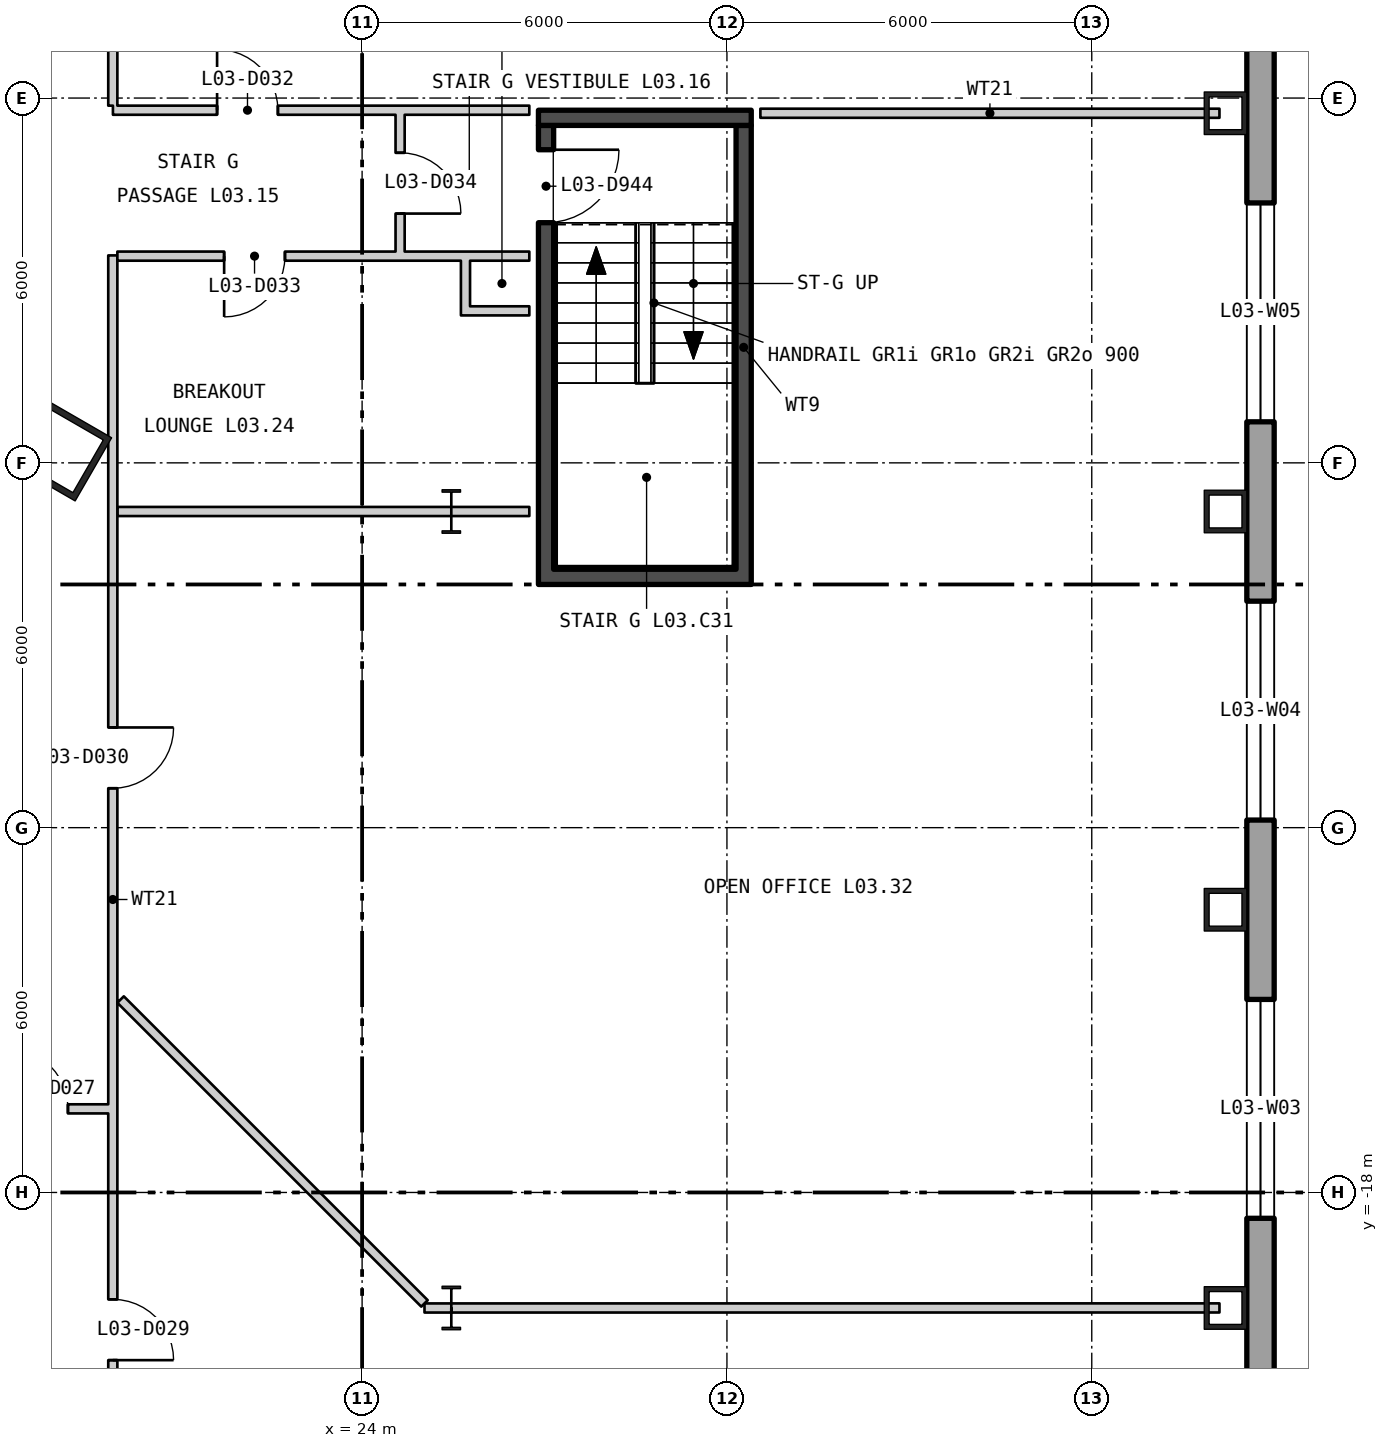
"""IFC4 building model, lengths in metres.
Left out: names, types, materials, properties, quantities, classifications, styles, units other than length and angle.
Written with IfcOpenShell. Run it as: python <this file> out.ifc"""

import sys

from ifc_helpers import new_model, si_unit, direction, frame, frame_2d, origin, origin_2d, place, context, subcontext, project, spatial, polyline, rectangle, hollow_rectangle, i_section, outline, extrude, element, fill, save


model = new_model("IFC4")
c1 = context("Model", 3, precision=1e-05, world=origin(), true_north=direction((0.0, 1.0)))
c2 = subcontext(c1, "Body", "Model", "MODEL_VIEW")
j1 = project(units=[si_unit("LENGTHUNIT", "METRE"), si_unit("PLANEANGLEUNIT", "RADIAN")], contexts=[c1])
p1 = place(None, origin())
s1 = spatial("IfcSite", under=j1, at=p1, CompositionType="ELEMENT")
p2 = place(p1, origin())
s2 = spatial("IfcBuilding", under=s1, at=p2, CompositionType="ELEMENT")
p3 = place(p2, frame((0.0, 0.0, 18.6)))
s3 = spatial("IfcBuildingStorey", under=s2, at=p3, CompositionType="ELEMENT", Elevation=18.6)
p4 = place(p3, frame((19.061, -5.807, 0.0), z_axis=(0.0, 0.0, 1.0), x_axis=(0.5, 0.866025403784, 0.0)))
e1 = element("IfcColumn", 1, at=p4, inside=s3, PredefinedType="COLUMN", context=c2, shape_type="SweptSolid", body=[
    extrude(hollow_rectangle(XDim=1.2, YDim=1.2, WallThickness=0.1, at=origin_2d()), origin(), (0.0, 0.0, 1.0), 5.1),
])
for number, where, z_axis, x_axis in (
    (2, (38.2, -19.9, 0.0), (0.0, 0.0, 1.0), (0.0, 1.0, 0.0)),
    (3, (38.2, -13.35, 0.0), (0.0, 0.0, 1.0), (0.0, 1.0, 0.0)),
    (4, (38.2, -6.8, 0.0), (0.0, 0.0, 1.0), (0.0, 1.0, 0.0)),
    (5, (38.2, -0.25, 0.0), (0.0, 0.0, 1.0), (0.0, 1.0, 0.0)),
):
    element("IfcColumn", number, at=place(p3, frame(where, z_axis=z_axis, x_axis=x_axis)), inside=s3, PredefinedType="COLUMN", context=c2, shape_type="SweptSolid", body=[
        extrude(hollow_rectangle(XDim=0.7, YDim=0.7, WallThickness=0.08, at=origin_2d()), origin(), (0.0, 0.0, 1.0), 5.1),
    ])
for number, where, z_axis, x_axis in (
    (6, (25.467, -6.8, 0.0), (0.0, 0.0, 1.0), (1.0, 0.0, 0.0)),
    (7, (25.467, -19.9, 0.0), (0.0, 0.0, 1.0), (1.0, 0.0, 0.0)),
):
    element("IfcColumn", number, at=place(p3, frame(where, z_axis=z_axis, x_axis=x_axis)), inside=s3, PredefinedType="COLUMN", context=c2, shape_type="SweptSolid", body=[
        extrude(i_section(OverallWidth=0.304, OverallDepth=0.716, WebThickness=0.021, FlangeThickness=0.04, at=origin_2d()), origin(), (0.0, 0.0, 1.0), 5.1),
    ])
p5 = place(p3, frame((38.775, -33.575, -0.4), z_axis=(0.0, 0.0, 1.0), x_axis=(0.0, 1.0, 0.0)))
e8 = element("IfcWall", 8, at=p5, inside=s3, PredefinedType="SOLIDWALL", context=c2, shape_type="SweptSolid", body=[
    extrude(outline(polyline([(-0.225, -0.225), (53.775, -0.225), (53.325, 0.225), (0.225, 0.225), (-0.225, -0.225)])), origin(), (0.0, 0.0, 1.0), 5.1),
])
p6 = place(p5, frame((2.05, 0.0, 1.3)))
e9 = element("IfcOpeningElement", 9, at=p6, cuts=e8, PredefinedType="OPENING", context=c2, shape_type="SweptSolid", body=[
    extrude(rectangle(XDim=3.6, YDim=3.2, at=frame_2d((1.8, 1.6))), frame((0.0, 0.235, 0.0), z_axis=(0.0, -1.0, 0.0), x_axis=(1.0, 0.0, 0.0)), (0.0, 0.0, 1.0), 0.47),
])
p7 = place(p5, frame((8.6, 0.0, 1.3)))
e10 = element("IfcOpeningElement", 10, at=p7, cuts=e8, PredefinedType="OPENING", context=c2, shape_type="SweptSolid", body=[
    extrude(rectangle(XDim=3.6, YDim=3.2, at=frame_2d((1.8, 1.6))), frame((0.0, 0.235, 0.0), z_axis=(0.0, -1.0, 0.0), x_axis=(1.0, 0.0, 0.0)), (0.0, 0.0, 1.0), 0.47),
])
p8 = place(p5, frame((15.15, 0.0, 1.3)))
e11 = element("IfcOpeningElement", 11, at=p8, cuts=e8, PredefinedType="OPENING", context=c2, shape_type="SweptSolid", body=[
    extrude(rectangle(XDim=3.6, YDim=3.2, at=frame_2d((1.8, 1.6))), frame((0.0, 0.235, 0.0), z_axis=(0.0, -1.0, 0.0), x_axis=(1.0, 0.0, 0.0)), (0.0, 0.0, 1.0), 0.47),
])
p9 = place(p5, frame((21.7, 0.0, 1.3)))
e12 = element("IfcOpeningElement", 12, at=p9, cuts=e8, PredefinedType="OPENING", context=c2, shape_type="SweptSolid", body=[
    extrude(rectangle(XDim=3.6, YDim=3.2, at=frame_2d((1.8, 1.6))), frame((0.0, 0.235, 0.0), z_axis=(0.0, -1.0, 0.0), x_axis=(1.0, 0.0, 0.0)), (0.0, 0.0, 1.0), 0.47),
])
p10 = place(p5, frame((28.25, 0.0, 1.3)))
e13 = element("IfcOpeningElement", 13, at=p10, cuts=e8, PredefinedType="OPENING", context=c2, shape_type="SweptSolid", body=[
    extrude(rectangle(XDim=3.6, YDim=3.2, at=frame_2d((1.8, 1.6))), frame((0.0, 0.235, 0.0), z_axis=(0.0, -1.0, 0.0), x_axis=(1.0, 0.0, 0.0)), (0.0, 0.0, 1.0), 0.47),
])
p11 = place(p5, frame((34.8, 0.0, 1.3)))
e14 = element("IfcOpeningElement", 14, at=p11, cuts=e8, PredefinedType="OPENING", context=c2, shape_type="SweptSolid", body=[
    extrude(rectangle(XDim=3.6, YDim=3.2, at=frame_2d((1.8, 1.6))), frame((0.0, 0.235, 0.0), z_axis=(0.0, -1.0, 0.0), x_axis=(1.0, 0.0, 0.0)), (0.0, 0.0, 1.0), 0.47),
])
p12 = place(p5, frame((41.35, 0.0, 1.3)))
e15 = element("IfcOpeningElement", 15, at=p12, cuts=e8, PredefinedType="OPENING", context=c2, shape_type="SweptSolid", body=[
    extrude(rectangle(XDim=3.6, YDim=3.2, at=frame_2d((1.8, 1.6))), frame((0.0, 0.235, 0.0), z_axis=(0.0, -1.0, 0.0), x_axis=(1.0, 0.0, 0.0)), (0.0, 0.0, 1.0), 0.47),
])
p13 = place(p5, frame((47.9, 0.0, 1.3)))
e16 = element("IfcOpeningElement", 16, at=p13, cuts=e8, PredefinedType="OPENING", context=c2, shape_type="SweptSolid", body=[
    extrude(rectangle(XDim=3.6, YDim=3.2, at=frame_2d((1.8, 1.6))), frame((0.0, 0.235, 0.0), z_axis=(0.0, -1.0, 0.0), x_axis=(1.0, 0.0, 0.0)), (0.0, 0.0, 1.0), 0.47),
])
p14 = place(p3, frame((27.025, -7.75, 0.0), z_axis=(0.0, 0.0, 1.0), x_axis=(0.0, 1.0, 0.0)))
e17 = element("IfcWall", 17, at=p14, inside=s3, PredefinedType="SHEAR", context=c2, shape_type="SweptSolid", body=[
    extrude(rectangle(XDim=7.3, YDim=0.25, at=frame_2d((3.65, 0.0))), origin(), (0.0, 0.0, 1.0), 4.88),
])
p15 = place(p14, frame((5.7, 0.0, 0.0)))
e18 = element("IfcOpeningElement", 18, at=p15, cuts=e17, PredefinedType="OPENING", context=c2, shape_type="SweptSolid", body=[
    extrude(rectangle(XDim=1.2, YDim=2.1, at=frame_2d((0.6, 1.05))), frame((0.0, 0.135, 0.0), z_axis=(0.0, -1.0, 0.0), x_axis=(1.0, 0.0, 0.0)), (0.0, 0.0, 1.0), 0.27),
])
p16 = place(p3, frame((30.275, -7.75, 0.0), z_axis=(0.0, 0.0, 1.0), x_axis=(0.0, 1.0, 0.0)))
e19 = element("IfcWall", 19, at=p16, inside=s3, PredefinedType="SHEAR", context=c2, shape_type="SweptSolid", body=[
    extrude(rectangle(XDim=7.3, YDim=0.25, at=frame_2d((3.65, 0.0))), origin(), (0.0, 0.0, 1.0), 4.88),
])
for number, where, z_axis, x_axis in (
    (20, (26.9, -7.875, 0.0), (0.0, 0.0, 1.0), (1.0, 0.0, 0.0)),
    (21, (26.9, -0.325, 0.0), (0.0, 0.0, 1.0), (1.0, 0.0, 0.0)),
):
    element("IfcWall", number, at=place(p3, frame(where, z_axis=z_axis, x_axis=x_axis)), inside=s3, PredefinedType="SHEAR", context=c2, shape_type="SweptSolid", body=[
        extrude(rectangle(XDim=3.5, YDim=0.25, at=frame_2d((1.75, 0.0))), origin(), (0.0, 0.0, 1.0), 4.88),
    ])
p17 = place(p3, frame((17.5, -16.625, 0.0), z_axis=(0.0, 0.0, 1.0), x_axis=(1.0, 0.0, 0.0)))
e22 = element("IfcWall", 22, at=p17, inside=s3, PredefinedType="PARTITIONING", context=c2, shape_type="SweptSolid", body=[
    extrude(rectangle(XDim=2.325, YDim=0.15, at=frame_2d((1.163, 0.0))), origin(), (0.0, 0.0, 1.0), 4.88),
])
p18 = place(p17, frame((0.662, 0.0, 0.0)))
e23 = element("IfcOpeningElement", 23, at=p18, cuts=e22, PredefinedType="OPENING", context=c2, shape_type="SweptSolid", body=[
    extrude(rectangle(XDim=1.0, YDim=2.1, at=frame_2d((0.5, 1.05))), frame((0.0, 0.085, 0.0), z_axis=(0.0, -1.0, 0.0), x_axis=(1.0, 0.0, 0.0)), (0.0, 0.0, 1.0), 0.17),
])
p19 = place(p3, frame((19.9, -23.775, 0.0), z_axis=(0.0, 0.0, 1.0), x_axis=(0.0, 1.0, 0.0)))
e24 = element("IfcWall", 24, at=p19, inside=s3, PredefinedType="PARTITIONING", context=c2, shape_type="SweptSolid", body=[
    extrude(rectangle(XDim=21.187, YDim=0.15, at=frame_2d((10.594, 0.0))), origin(), (0.0, 0.0, 1.0), 4.88),
])
p20 = place(p19, frame((3.017, 0.0, 0.0)))
e25 = element("IfcOpeningElement", 25, at=p20, cuts=e24, PredefinedType="OPENING", context=c2, shape_type="SweptSolid", body=[
    extrude(rectangle(XDim=1.0, YDim=2.1, at=frame_2d((0.5, 1.05))), frame((0.0, 0.085, 0.0), z_axis=(0.0, -1.0, 0.0), x_axis=(1.0, 0.0, 0.0)), (0.0, 0.0, 1.0), 0.17),
])
p21 = place(p19, frame((12.423, 0.0, 0.0)))
e26 = element("IfcOpeningElement", 26, at=p21, cuts=e24, PredefinedType="OPENING", context=c2, shape_type="SweptSolid", body=[
    extrude(rectangle(XDim=1.0, YDim=2.1, at=frame_2d((0.5, 1.05))), frame((0.0, 0.085, 0.0), z_axis=(0.0, -1.0, 0.0), x_axis=(1.0, 0.0, 0.0)), (0.0, 0.0, 1.0), 0.17),
])
p22 = place(p3, frame((19.9, -0.125, 0.0), z_axis=(0.0, 0.0, 1.0), x_axis=(0.0, 1.0, 0.0)))
e27 = element("IfcWall", 27, at=p22, inside=s3, PredefinedType="PARTITIONING", context=c2, shape_type="SweptSolid", body=[
    extrude(rectangle(XDim=1.15, YDim=0.15, at=frame_2d((0.575, 0.0))), origin(), (0.0, 0.0, 1.0), 4.88),
])
p23 = place(p3, frame((19.902, -0.2, 0.0), z_axis=(0.0, 0.0, 1.0), x_axis=(1.0, 0.0, 0.0)))
e28 = element("IfcWall", 28, at=p23, inside=s3, PredefinedType="PARTITIONING", context=c2, shape_type="SweptSolid", body=[
    extrude(rectangle(XDim=6.848, YDim=0.15, at=frame_2d((3.424, 0.0))), origin(), (0.0, 0.0, 1.0), 4.88),
])
p24 = place(p23, frame((1.713, 0.0, 0.0)))
e29 = element("IfcOpeningElement", 29, at=p24, cuts=e28, PredefinedType="OPENING", context=c2, shape_type="SweptSolid", body=[
    extrude(rectangle(XDim=1.0, YDim=2.1, at=frame_2d((0.5, 1.05))), frame((0.0, 0.085, 0.0), z_axis=(0.0, -1.0, 0.0), x_axis=(1.0, 0.0, 0.0)), (0.0, 0.0, 1.0), 0.17),
])
p25 = place(p3, frame((19.975, -6.8, 0.0), z_axis=(0.0, 0.0, 1.0), x_axis=(1.0, 0.0, 0.0)))
e30 = element("IfcWall", 30, at=p25, inside=s3, PredefinedType="PARTITIONING", context=c2, shape_type="SweptSolid", body=[
    extrude(rectangle(XDim=6.775, YDim=0.15, at=frame_2d((3.388, 0.0))), origin(), (0.0, 0.0, 1.0), 4.09),
])
p26 = place(p3, frame((19.975, -2.6, 0.0), z_axis=(0.0, 0.0, 1.0), x_axis=(1.0, 0.0, 0.0)))
e31 = element("IfcWall", 31, at=p26, inside=s3, PredefinedType="PARTITIONING", context=c2, shape_type="SweptSolid", body=[
    extrude(rectangle(XDim=5.713, YDim=0.15, at=frame_2d((2.857, 0.0))), origin(), (0.0, 0.0, 1.0), 4.88),
])
p27 = place(p26, frame((1.756, 0.0, 0.0)))
e32 = element("IfcOpeningElement", 32, at=p27, cuts=e31, PredefinedType="OPENING", context=c2, shape_type="SweptSolid", body=[
    extrude(rectangle(XDim=1.0, YDim=2.1, at=frame_2d((0.5, 1.05))), frame((0.0, 0.085, 0.0), z_axis=(0.0, -1.0, 0.0), x_axis=(1.0, 0.0, 0.0)), (0.0, 0.0, 1.0), 0.17),
])
p28 = place(p3, frame((20.028, -14.827, 0.0), z_axis=(0.0, 0.0, 1.0), x_axis=(0.707106781187, -0.707106781187, 0.0)))
e33 = element("IfcWall", 33, at=p28, inside=s3, PredefinedType="PARTITIONING", context=c2, shape_type="SweptSolid", body=[
    extrude(rectangle(XDim=7.068, YDim=0.15, at=frame_2d((3.534, 0.0))), origin(), (0.0, 0.0, 1.0), 4.88),
])
p29 = place(p3, frame((24.625, -2.525, 0.0), z_axis=(0.0, 0.0, 1.0), x_axis=(0.0, 1.0, 0.0)))
e34 = element("IfcWall", 34, at=p29, inside=s3, PredefinedType="PARTITIONING", context=c2, shape_type="SweptSolid", body=[
    extrude(rectangle(XDim=2.25, YDim=0.15, at=frame_2d((1.125, 0.0))), origin(), (0.0, 0.0, 1.0), 4.88),
])
p30 = place(p29, frame((0.625, 0.0, 0.0)))
e35 = element("IfcOpeningElement", 35, at=p30, cuts=e34, PredefinedType="OPENING", context=c2, shape_type="SweptSolid", body=[
    extrude(rectangle(XDim=1.0, YDim=2.1, at=frame_2d((0.5, 1.05))), frame((0.0, 0.085, 0.0), z_axis=(0.0, -1.0, 0.0), x_axis=(1.0, 0.0, 0.0)), (0.0, 0.0, 1.0), 0.17),
])
p31 = place(p3, frame((25.026, -19.9, 0.0), z_axis=(0.0, 0.0, 1.0), x_axis=(1.0, 0.0, 0.0)))
e36 = element("IfcWall", 36, at=p31, inside=s3, PredefinedType="PARTITIONING", context=c2, shape_type="SweptSolid", body=[
    extrude(rectangle(XDim=0.441, YDim=0.15, at=frame_2d((0.221, 0.0))), origin(), (0.0, 0.0, 1.0), 4.88),
])
p32 = place(p3, frame((25.467, -19.9, 0.0), z_axis=(0.0, 0.0, 1.0), x_axis=(0.999999996867, 7.9157761e-05, 0.0)))
e37 = element("IfcWall", 37, at=p32, inside=s3, PredefinedType="PARTITIONING", context=c2, shape_type="SweptSolid", body=[
    extrude(rectangle(XDim=12.633, YDim=0.15, at=frame_2d((6.316, 0.0))), origin(), (0.0, 0.0, 1.0), 4.09),
])
p33 = place(p3, frame((25.625, -3.5, 0.0), z_axis=(0.0, 0.0, 1.0), x_axis=(1.0, 0.0, 0.0)))
e38 = element("IfcWall", 38, at=p33, inside=s3, PredefinedType="PARTITIONING", context=c2, shape_type="SweptSolid", body=[
    extrude(rectangle(XDim=1.125, YDim=0.15, at=frame_2d((0.562, 0.0))), origin(), (0.0, 0.0, 1.0), 4.88),
])
p34 = place(p3, frame((25.688, -2.6, 0.0), z_axis=(0.0, 0.0, 1.0), x_axis=(1.0, 0.0, 0.0)))
e39 = element("IfcWall", 39, at=p34, inside=s3, PredefinedType="PARTITIONING", context=c2, shape_type="SweptSolid", body=[
    extrude(rectangle(XDim=1.062, YDim=0.15, at=frame_2d((0.531, 0.0))), origin(), (0.0, 0.0, 1.0), 4.88),
])
p35 = place(p3, frame((25.7, -3.425, 0.0), z_axis=(0.0, 0.0, 1.0), x_axis=(0.0, 1.0, 0.0)))
e40 = element("IfcWall", 40, at=p35, inside=s3, PredefinedType="PARTITIONING", context=c2, shape_type="SweptSolid", body=[
    extrude(rectangle(XDim=0.75, YDim=0.15, at=frame_2d((0.375, 0.0))), origin(), (0.0, 0.0, 1.0), 4.88),
])
p36 = place(p3, frame((30.55, -0.25, 0.0), z_axis=(0.0, 0.0, 1.0), x_axis=(1.0, 0.0, 0.0)))
e41 = element("IfcWall", 41, at=p36, inside=s3, PredefinedType="PARTITIONING", context=c2, shape_type="SweptSolid", body=[
    extrude(rectangle(XDim=7.55, YDim=0.15, at=frame_2d((3.775, 0.0))), origin(), (0.0, 0.0, 1.0), 4.88),
])
p37 = place(p8, origin())
e42 = element("IfcWindow", 42, at=p37, inside=s3, PartitioningType="SINGLE_PANEL", PredefinedType="WINDOW", context=c2, shape_type="SweptSolid", body=[
    extrude(rectangle(XDim=3.6, YDim=3.2, at=frame_2d((1.8, 1.6))), frame((0.0, 0.105, 0.0), z_axis=(0.0, -1.0, 0.0), x_axis=(1.0, 0.0, 0.0)), (0.0, 0.0, 1.0), 0.06),
])
fill(e11, e42)
p38 = place(p9, origin())
e43 = element("IfcWindow", 43, at=p38, inside=s3, PartitioningType="SINGLE_PANEL", PredefinedType="WINDOW", context=c2, shape_type="SweptSolid", body=[
    extrude(rectangle(XDim=3.6, YDim=3.2, at=frame_2d((1.8, 1.6))), frame((0.0, 0.105, 0.0), z_axis=(0.0, -1.0, 0.0), x_axis=(1.0, 0.0, 0.0)), (0.0, 0.0, 1.0), 0.06),
])
fill(e12, e43)
p39 = place(p10, origin())
e44 = element("IfcWindow", 44, at=p39, inside=s3, PartitioningType="SINGLE_PANEL", PredefinedType="WINDOW", context=c2, shape_type="SweptSolid", body=[
    extrude(rectangle(XDim=3.6, YDim=3.2, at=frame_2d((1.8, 1.6))), frame((0.0, 0.105, 0.0), z_axis=(0.0, -1.0, 0.0), x_axis=(1.0, 0.0, 0.0)), (0.0, 0.0, 1.0), 0.06),
])
fill(e13, e44)
p40 = place(p15, origin())
e45 = element("IfcDoor", 45, at=p40, inside=s3, OperationType="SINGLE_SWING_RIGHT", PredefinedType="DOOR", context=c2, shape_type="SweptSolid", body=[
    extrude(rectangle(XDim=1.2, YDim=2.1, at=frame_2d((0.6, 1.05))), frame((0.0, 0.025, 0.0), z_axis=(0.0, -1.0, 0.0), x_axis=(1.0, 0.0, 0.0)), (0.0, 0.0, 1.0), 0.05),
])
fill(e18, e45)
p41 = place(p18, origin())
e46 = element("IfcDoor", 46, at=p41, inside=s3, OperationType="SINGLE_SWING_RIGHT", PredefinedType="DOOR", context=c2, shape_type="SweptSolid", body=[
    extrude(rectangle(XDim=1.0, YDim=2.1, at=frame_2d((0.5, 1.05))), frame((0.0, 0.025, 0.0), z_axis=(0.0, -1.0, 0.0), x_axis=(1.0, 0.0, 0.0)), (0.0, 0.0, 1.0), 0.05),
])
fill(e23, e46)
p42 = place(p20, origin())
e47 = element("IfcDoor", 47, at=p42, inside=s3, OperationType="SINGLE_SWING_LEFT", PredefinedType="DOOR", context=c2, shape_type="SweptSolid", body=[
    extrude(rectangle(XDim=1.0, YDim=2.1, at=frame_2d((0.5, 1.05))), frame((0.0, 0.025, 0.0), z_axis=(0.0, -1.0, 0.0), x_axis=(1.0, 0.0, 0.0)), (0.0, 0.0, 1.0), 0.05),
])
fill(e25, e47)
p43 = place(p21, origin())
e48 = element("IfcDoor", 48, at=p43, inside=s3, OperationType="SINGLE_SWING_RIGHT", PredefinedType="DOOR", context=c2, shape_type="SweptSolid", body=[
    extrude(rectangle(XDim=1.0, YDim=2.1, at=frame_2d((0.5, 1.05))), frame((0.0, 0.025, 0.0), z_axis=(0.0, -1.0, 0.0), x_axis=(1.0, 0.0, 0.0)), (0.0, 0.0, 1.0), 0.05),
])
fill(e26, e48)
p44 = place(p24, origin())
e49 = element("IfcDoor", 49, at=p44, inside=s3, OperationType="SINGLE_SWING_RIGHT", PredefinedType="DOOR", context=c2, shape_type="SweptSolid", body=[
    extrude(rectangle(XDim=1.0, YDim=2.1, at=frame_2d((0.5, 1.05))), frame((0.0, 0.025, 0.0), z_axis=(0.0, -1.0, 0.0), x_axis=(1.0, 0.0, 0.0)), (0.0, 0.0, 1.0), 0.05),
])
fill(e29, e49)
p45 = place(p27, origin())
e50 = element("IfcDoor", 50, at=p45, inside=s3, OperationType="SINGLE_SWING_LEFT", PredefinedType="DOOR", context=c2, shape_type="SweptSolid", body=[
    extrude(rectangle(XDim=1.0, YDim=2.1, at=frame_2d((0.5, 1.05))), frame((0.0, 0.025, 0.0), z_axis=(0.0, -1.0, 0.0), x_axis=(1.0, 0.0, 0.0)), (0.0, 0.0, 1.0), 0.05),
])
fill(e32, e50)
p46 = place(p30, origin())
e51 = element("IfcDoor", 51, at=p46, inside=s3, OperationType="SINGLE_SWING_LEFT", PredefinedType="DOOR", context=c2, shape_type="SweptSolid", body=[
    extrude(rectangle(XDim=1.0, YDim=2.1, at=frame_2d((0.5, 1.05))), frame((0.0, 0.025, 0.0), z_axis=(0.0, -1.0, 0.0), x_axis=(1.0, 0.0, 0.0)), (0.0, 0.0, 1.0), 0.05),
])
fill(e35, e51)
save(model, sys.argv[1])
